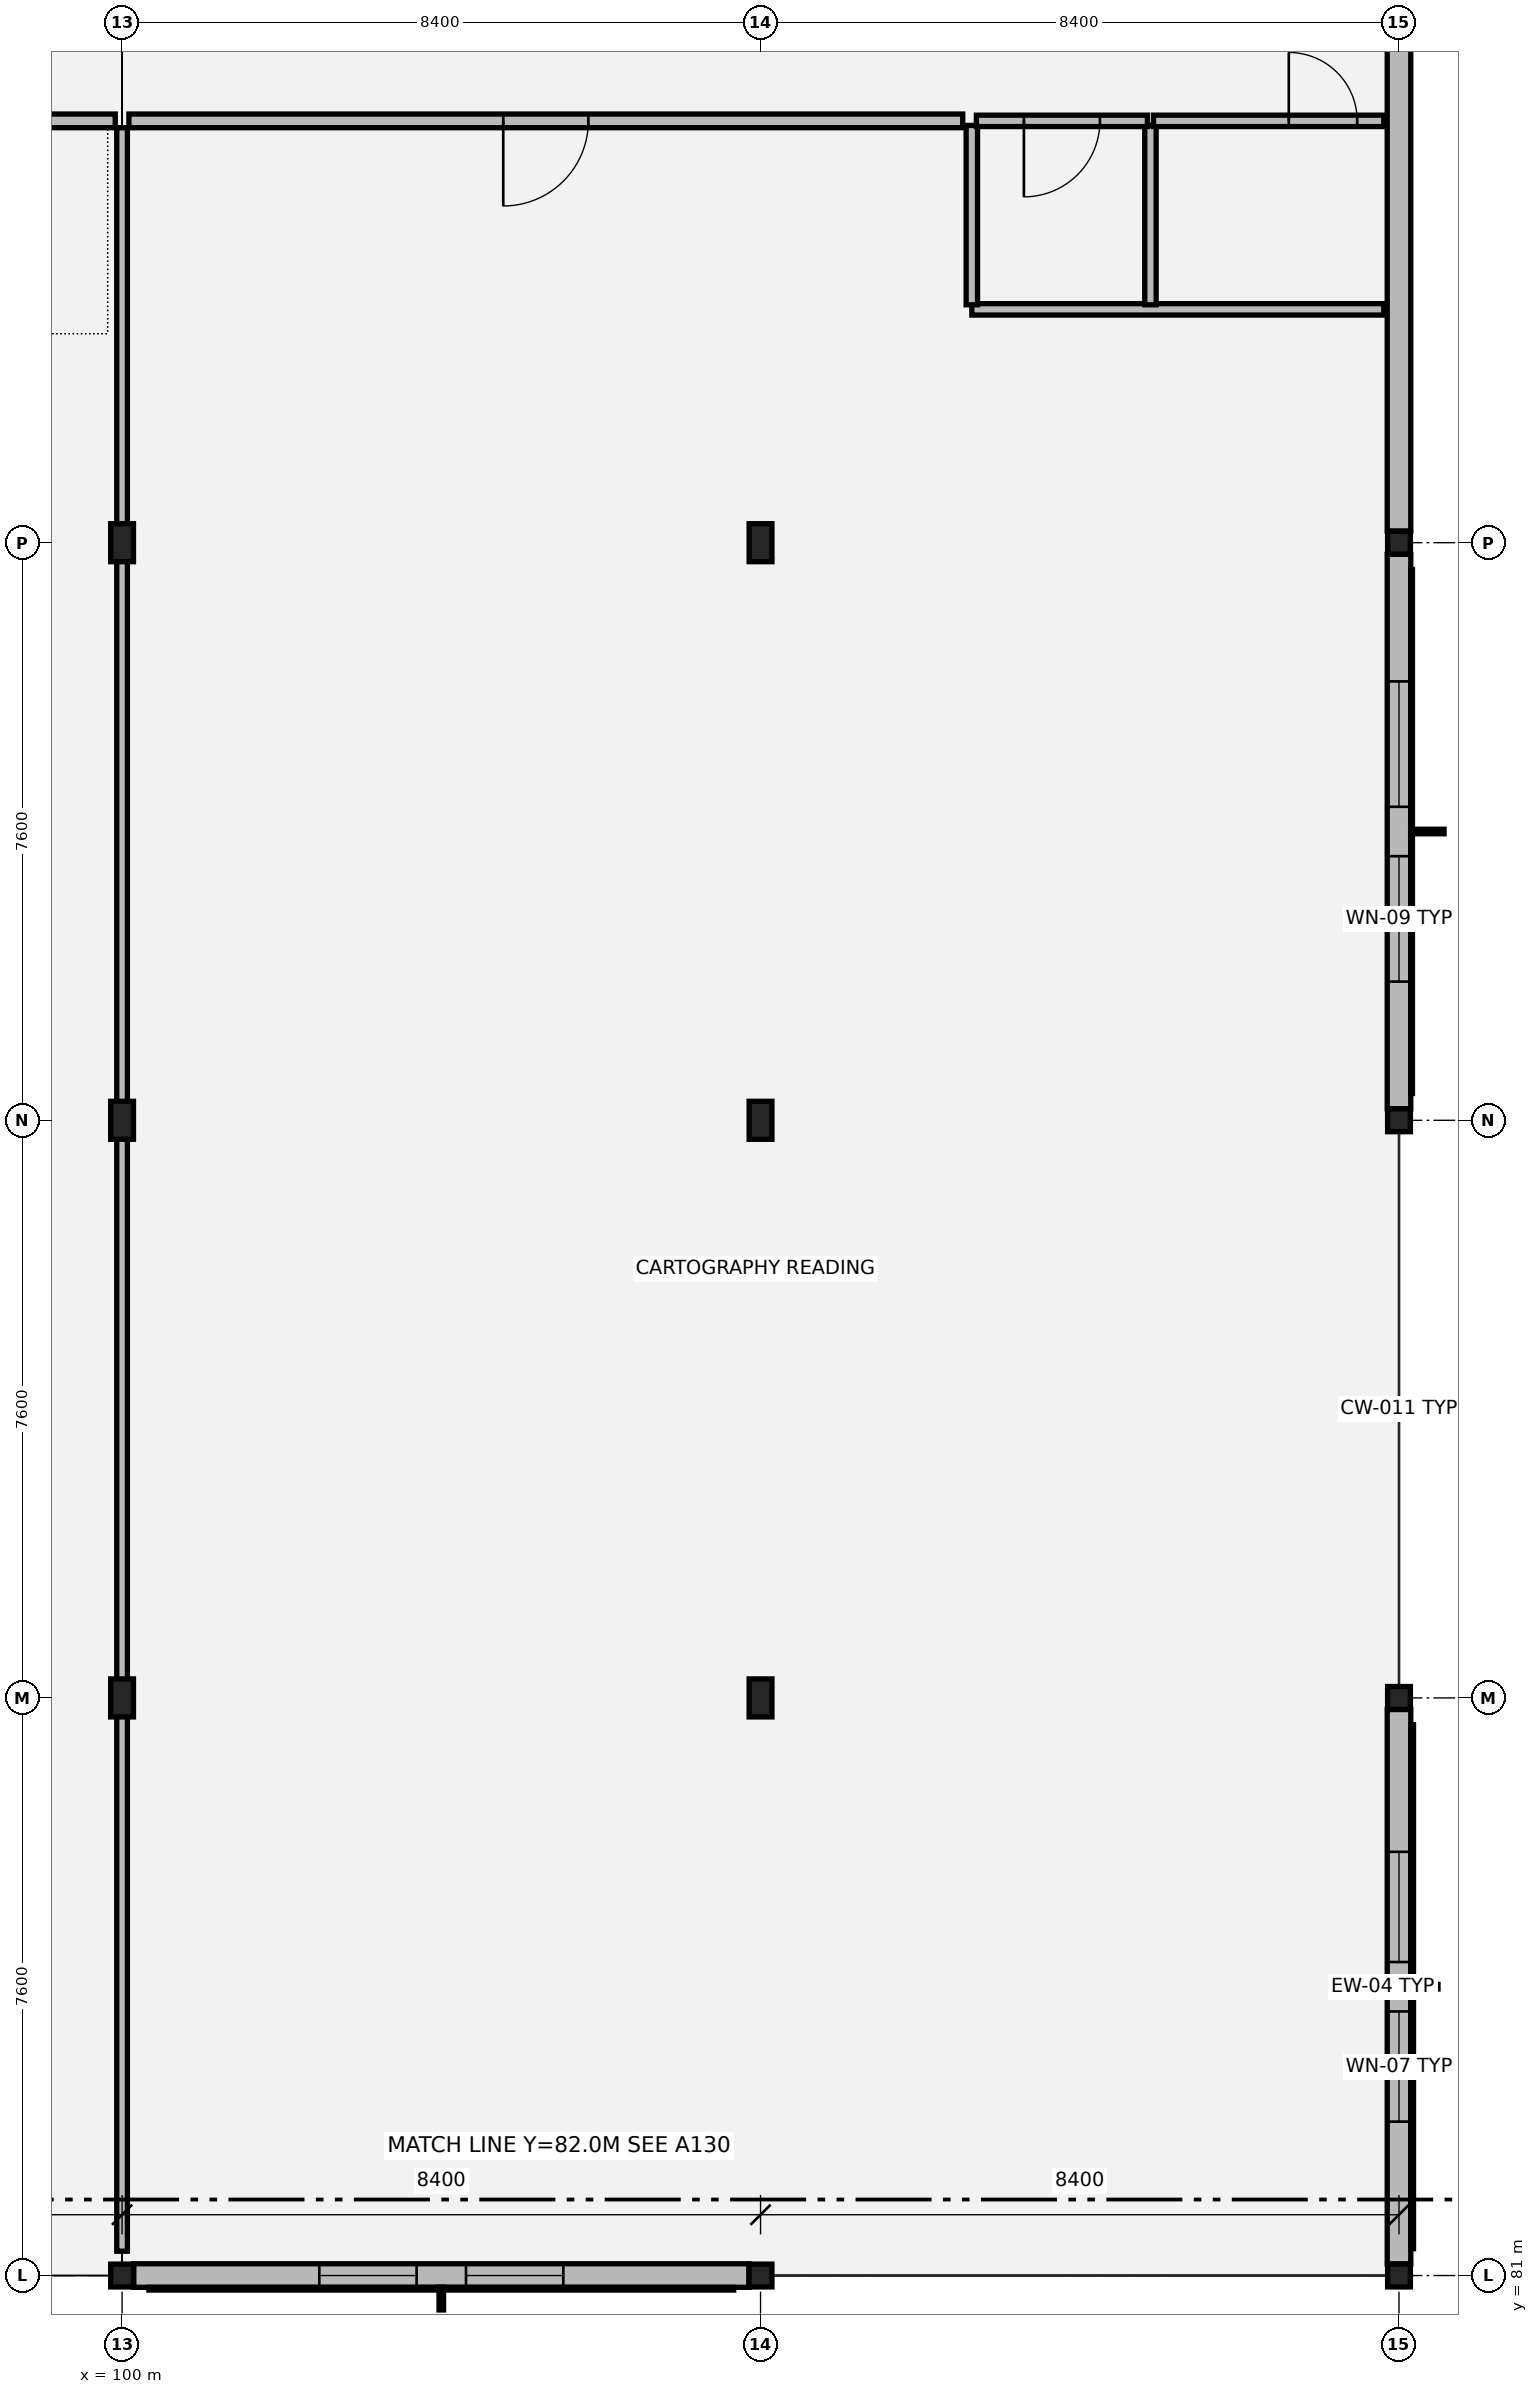
"""IFC4 building model, lengths in metres.
Left out: names, types, materials, properties, quantities, classifications, styles, units other than length and angle.
Written with IfcOpenShell. Run it as: python <this file> out.ifc"""

import sys

from ifc_helpers import new_model, si_unit, direction, frame, frame_2d, origin, origin_2d, place, context, subcontext, project, spatial, rectangle, hollow_rectangle, i_section, extrude, element, fill, save


model = new_model("IFC4")
c1 = context("Model", 3, precision=1e-05, world=origin(), true_north=direction((0.0, 1.0)))
c2 = subcontext(c1, "Body", "Model", "MODEL_VIEW")
j1 = project(units=[si_unit("LENGTHUNIT", "METRE"), si_unit("PLANEANGLEUNIT", "RADIAN")], contexts=[c1])
p1 = place(None, origin())
s1 = spatial("IfcSite", under=j1, at=p1, CompositionType="ELEMENT")
p2 = place(p1, origin())
s2 = spatial("IfcBuilding", under=s1, at=p2, CompositionType="ELEMENT")
p3 = place(p2, frame((0.0, 0.0, 5.1)))
s3 = spatial("IfcBuildingStorey", under=s2, at=p3, CompositionType="ELEMENT", Elevation=5.1)
p4 = place(p3, frame((100.0, 81.0, 0.0), z_axis=(0.0, 0.0, 1.0), x_axis=(1.0, 0.0, 0.0)))
e1 = element("IfcColumn", 1, at=p4, inside=s3, PredefinedType="COLUMN", context=c2, shape_type="SweptSolid", body=[
    extrude(hollow_rectangle(XDim=0.3, YDim=0.3, WallThickness=0.012, at=origin_2d()), origin(), (0.0, 0.0, 1.0), 4.055),
])
for number, where, z_axis, x_axis in (
    (2, (100.0, 88.6, 0.0), (0.0, 0.0, 1.0), (1.0, 0.0, 0.0)),
    (3, (100.0, 96.2, 0.0), (0.0, 0.0, 1.0), (1.0, 0.0, 0.0)),
    (4, (100.0, 103.8, 0.0), (0.0, 0.0, 1.0), (1.0, 0.0, 0.0)),
):
    element("IfcColumn", number, at=place(p3, frame(where, z_axis=z_axis, x_axis=x_axis)), inside=s3, PredefinedType="COLUMN", context=c2, shape_type="SweptSolid", body=[
        extrude(i_section(OverallWidth=0.3, OverallDepth=0.5, WebThickness=0.014, FlangeThickness=0.028, at=origin_2d()), origin(), (0.0, 0.0, 1.0), 4.055),
    ])
p5 = place(p3, frame((108.4, 81.0, 0.0), z_axis=(0.0, 0.0, 1.0), x_axis=(1.0, 0.0, 0.0)))
e5 = element("IfcColumn", 5, at=p5, inside=s3, PredefinedType="COLUMN", context=c2, shape_type="SweptSolid", body=[
    extrude(hollow_rectangle(XDim=0.3, YDim=0.3, WallThickness=0.012, at=origin_2d()), origin(), (0.0, 0.0, 1.0), 4.055),
])
for number, where, z_axis, x_axis in (
    (6, (108.4, 88.6, 0.0), (0.0, 0.0, 1.0), (1.0, 0.0, 0.0)),
    (7, (108.4, 96.2, 0.0), (0.0, 0.0, 1.0), (1.0, 0.0, 0.0)),
    (8, (108.4, 103.8, 0.0), (0.0, 0.0, 1.0), (1.0, 0.0, 0.0)),
):
    element("IfcColumn", number, at=place(p3, frame(where, z_axis=z_axis, x_axis=x_axis)), inside=s3, PredefinedType="COLUMN", context=c2, shape_type="SweptSolid", body=[
        extrude(i_section(OverallWidth=0.3, OverallDepth=0.5, WebThickness=0.014, FlangeThickness=0.028, at=origin_2d()), origin(), (0.0, 0.0, 1.0), 4.055),
    ])
for number, where, z_axis, x_axis in (
    (9, (116.8, 81.0, 0.0), (0.0, 0.0, 1.0), (1.0, 0.0, 0.0)),
    (10, (116.8, 88.6, 0.0), (0.0, 0.0, 1.0), (1.0, 0.0, 0.0)),
    (11, (116.8, 96.2, 0.0), (0.0, 0.0, 1.0), (1.0, 0.0, 0.0)),
    (12, (116.8, 103.8, 0.0), (0.0, 0.0, 1.0), (1.0, 0.0, 0.0)),
):
    element("IfcColumn", number, at=place(p3, frame(where, z_axis=z_axis, x_axis=x_axis)), inside=s3, PredefinedType="COLUMN", context=c2, shape_type="SweptSolid", body=[
        extrude(hollow_rectangle(XDim=0.3, YDim=0.3, WallThickness=0.012, at=origin_2d()), origin(), (0.0, 0.0, 1.0), 4.055),
    ])
p6 = place(p3, frame((100.153, 81.0, 0.0), z_axis=(0.0, 0.0, 1.0), x_axis=(1.0, 0.0, 0.0)))
e13 = element("IfcWall", 13, at=p6, inside=s3, PredefinedType="SOLIDWALL", context=c2, shape_type="SweptSolid", body=[
    extrude(rectangle(XDim=8.094, YDim=0.31, at=frame_2d((4.047, 0.0))), origin(), (0.0, 0.0, 1.0), 3.48),
])
p7 = place(p6, frame((2.442, 0.0, 0.8)))
e14 = element("IfcOpeningElement", 14, at=p7, cuts=e13, PredefinedType="OPENING", context=c2, shape_type="SweptSolid", body=[
    extrude(rectangle(XDim=1.28, YDim=2.08, at=frame_2d((0.64, 1.04))), frame((0.0, 0.165, 0.0), z_axis=(0.0, -1.0, 0.0), x_axis=(1.0, 0.0, 0.0)), (0.0, 0.0, 1.0), 0.33),
])
p8 = place(p6, frame((4.372, 0.0, 0.8)))
e15 = element("IfcOpeningElement", 15, at=p8, cuts=e13, PredefinedType="OPENING", context=c2, shape_type="SweptSolid", body=[
    extrude(rectangle(XDim=1.28, YDim=2.08, at=frame_2d((0.64, 1.04))), frame((0.0, 0.165, 0.0), z_axis=(0.0, -1.0, 0.0), x_axis=(1.0, 0.0, 0.0)), (0.0, 0.0, 1.0), 0.33),
])
p9 = place(p3, frame((116.8, 81.153, 0.0), z_axis=(0.0, 0.0, 1.0), x_axis=(0.0, 1.0, 0.0)))
e16 = element("IfcWall", 16, at=p9, inside=s3, PredefinedType="SOLIDWALL", context=c2, shape_type="SweptSolid", body=[
    extrude(rectangle(XDim=7.294, YDim=0.31, at=frame_2d((3.647, 0.0))), origin(), (0.0, 0.0, 1.0), 3.48),
])
p10 = place(p9, frame((1.872, 0.0, 0.8)))
e17 = element("IfcOpeningElement", 17, at=p10, cuts=e16, PredefinedType="OPENING", context=c2, shape_type="SweptSolid", body=[
    extrude(rectangle(XDim=1.45, YDim=2.2, at=frame_2d((0.725, 1.1))), frame((0.0, 0.165, 0.0), z_axis=(0.0, -1.0, 0.0), x_axis=(1.0, 0.0, 0.0)), (0.0, 0.0, 1.0), 0.33),
])
p11 = place(p9, frame((3.972, 0.0, 0.8)))
e18 = element("IfcOpeningElement", 18, at=p11, cuts=e16, PredefinedType="OPENING", context=c2, shape_type="SweptSolid", body=[
    extrude(rectangle(XDim=1.45, YDim=2.2, at=frame_2d((0.725, 1.1))), frame((0.0, 0.165, 0.0), z_axis=(0.0, -1.0, 0.0), x_axis=(1.0, 0.0, 0.0)), (0.0, 0.0, 1.0), 0.33),
])
p12 = place(p3, frame((116.8, 96.353, 0.0), z_axis=(0.0, 0.0, 1.0), x_axis=(0.0, 1.0, 0.0)))
e19 = element("IfcWall", 19, at=p12, inside=s3, PredefinedType="SOLIDWALL", context=c2, shape_type="SweptSolid", body=[
    extrude(rectangle(XDim=7.294, YDim=0.31, at=frame_2d((3.647, 0.0))), origin(), (0.0, 0.0, 1.0), 3.48),
])
p13 = place(p12, frame((1.672, 0.0, 0.8)))
e20 = element("IfcOpeningElement", 20, at=p13, cuts=e19, PredefinedType="OPENING", context=c2, shape_type="SweptSolid", body=[
    extrude(rectangle(XDim=1.65, YDim=2.25, at=frame_2d((0.825, 1.125))), frame((0.0, 0.165, 0.0), z_axis=(0.0, -1.0, 0.0), x_axis=(1.0, 0.0, 0.0)), (0.0, 0.0, 1.0), 0.33),
])
p14 = place(p12, frame((3.972, 0.0, 0.8)))
e21 = element("IfcOpeningElement", 21, at=p14, cuts=e19, PredefinedType="OPENING", context=c2, shape_type="SweptSolid", body=[
    extrude(rectangle(XDim=1.65, YDim=2.25, at=frame_2d((0.825, 1.125))), frame((0.0, 0.165, 0.0), z_axis=(0.0, -1.0, 0.0), x_axis=(1.0, 0.0, 0.0)), (0.0, 0.0, 1.0), 0.33),
])
p15 = place(p3, frame((116.8, 103.953, 0.0), z_axis=(0.0, 0.0, 1.0), x_axis=(0.0, 1.0, 0.0)))
e22 = element("IfcWall", 22, at=p15, inside=s3, PredefinedType="SOLIDWALL", context=c2, shape_type="SweptSolid", body=[
    extrude(rectangle(XDim=7.294, YDim=0.31, at=frame_2d((3.647, 0.0))), origin(), (0.0, 0.0, 1.0), 3.48),
])
p16 = place(p3, frame((111.18, 106.87, 0.0), z_axis=(0.0, 0.0, 1.0), x_axis=(1.0, 0.0, 0.0)))
e23 = element("IfcWall", 23, at=p16, inside=s3, PredefinedType="PARTITIONING", context=c2, shape_type="SweptSolid", body=[
    extrude(rectangle(XDim=5.42, YDim=0.15, at=frame_2d((2.71, 0.0))), origin(), (0.0, 0.0, 1.0), 3.18),
])
for number, where, z_axis, x_axis in (
    (24, (111.18, 106.93, 0.0), (0.0, 0.0, 1.0), (0.0, 1.0, 0.0)),
    (25, (113.53, 106.93, 0.0), (0.0, 0.0, 1.0), (0.0, 1.0, 0.0)),
):
    element("IfcWall", number, at=place(p3, frame(where, z_axis=z_axis, x_axis=x_axis)), inside=s3, PredefinedType="PARTITIONING", context=c2, shape_type="SweptSolid", body=[
        extrude(rectangle(XDim=2.36, YDim=0.15, at=frame_2d((1.18, 0.0))), origin(), (0.0, 0.0, 1.0), 3.18),
    ])
p17 = place(p3, frame((111.24, 109.35, 0.0), z_axis=(0.0, 0.0, 1.0), x_axis=(1.0, 0.0, 0.0)))
e26 = element("IfcWall", 26, at=p17, inside=s3, PredefinedType="PARTITIONING", context=c2, shape_type="SweptSolid", body=[
    extrude(rectangle(XDim=2.25, YDim=0.15, at=frame_2d((1.125, 0.0))), origin(), (0.0, 0.0, 1.0), 3.18),
])
p18 = place(p17, frame((0.625, 0.0, 0.0)))
e27 = element("IfcOpeningElement", 27, at=p18, cuts=e26, PredefinedType="OPENING", context=c2, shape_type="SweptSolid", body=[
    extrude(rectangle(XDim=1.0, YDim=2.15, at=frame_2d((0.5, 1.075))), frame((0.0, 0.085, 0.0), z_axis=(0.0, -1.0, 0.0), x_axis=(1.0, 0.0, 0.0)), (0.0, 0.0, 1.0), 0.17),
])
p19 = place(p3, frame((113.57, 109.35, 0.0), z_axis=(0.0, 0.0, 1.0), x_axis=(1.0, 0.0, 0.0)))
e28 = element("IfcWall", 28, at=p19, inside=s3, PredefinedType="PARTITIONING", context=c2, shape_type="SweptSolid", body=[
    extrude(rectangle(XDim=3.03, YDim=0.15, at=frame_2d((1.515, 0.0))), origin(), (0.0, 0.0, 1.0), 3.18),
])
p20 = place(p19, frame((1.78, 0.0, 0.0)))
e29 = element("IfcOpeningElement", 29, at=p20, cuts=e28, PredefinedType="OPENING", context=c2, shape_type="SweptSolid", body=[
    extrude(rectangle(XDim=0.9, YDim=2.15, at=frame_2d((0.45, 1.075))), frame((0.0, 0.085, 0.0), z_axis=(0.0, -1.0, 0.0), x_axis=(1.0, 0.0, 0.0)), (0.0, 0.0, 1.0), 0.17),
])
p21 = place(p3, frame((91.69, 109.35, 0.0), z_axis=(0.0, 0.0, 1.0), x_axis=(1.0, 0.0, 0.0)))
e30 = element("IfcWall", 30, at=p21, inside=s3, PredefinedType="PARTITIONING", context=c2, shape_type="SweptSolid", body=[
    extrude(rectangle(XDim=8.22, YDim=0.18, at=frame_2d((4.11, 0.0))), origin(), (0.0, 0.0, 1.0), 3.18),
])
p22 = place(p21, frame((3.48, 0.0, 0.0)))
e31 = element("IfcOpeningElement", 31, at=p22, cuts=e30, PredefinedType="OPENING", context=c2, shape_type="SweptSolid", body=[
    extrude(rectangle(XDim=1.26, YDim=2.2, at=frame_2d((0.63, 1.1))), frame((0.0, 0.1, 0.0), z_axis=(0.0, -1.0, 0.0), x_axis=(1.0, 0.0, 0.0)), (0.0, 0.0, 1.0), 0.2),
])
p23 = place(p3, frame((100.09, 109.35, 0.0), z_axis=(0.0, 0.0, 1.0), x_axis=(1.0, 0.0, 0.0)))
e32 = element("IfcWall", 32, at=p23, inside=s3, PredefinedType="PARTITIONING", context=c2, shape_type="SweptSolid", body=[
    extrude(rectangle(XDim=10.97, YDim=0.18, at=frame_2d((5.485, 0.0))), origin(), (0.0, 0.0, 1.0), 3.18),
])
p24 = place(p23, frame((4.925, 0.0, 0.0)))
e33 = element("IfcOpeningElement", 33, at=p24, cuts=e32, PredefinedType="OPENING", context=c2, shape_type="SweptSolid", body=[
    extrude(rectangle(XDim=1.12, YDim=2.15, at=frame_2d((0.56, 1.075))), frame((0.0, 0.1, 0.0), z_axis=(0.0, -1.0, 0.0), x_axis=(1.0, 0.0, 0.0)), (0.0, 0.0, 1.0), 0.2),
])
p25 = place(p3, frame((100.0, 81.32, 0.0), z_axis=(0.0, 0.0, 1.0), x_axis=(0.0, 1.0, 0.0)))
e34 = element("IfcWall", 34, at=p25, inside=s3, PredefinedType="PARTITIONING", context=c2, shape_type="SweptSolid", body=[
    extrude(rectangle(XDim=27.94, YDim=0.14, at=frame_2d((13.97, 0.0))), origin(), (0.0, 0.0, 1.0), 3.18),
])
p26 = place(p7, origin())
e35 = element("IfcWindow", 35, at=p26, inside=s3, PartitioningType="SINGLE_PANEL", PredefinedType="WINDOW", context=c2, shape_type="SweptSolid", body=[
    extrude(rectangle(XDim=1.28, YDim=2.08, at=frame_2d((0.64, 1.04))), frame((0.0, 0.03, 0.0), z_axis=(0.0, -1.0, 0.0), x_axis=(1.0, 0.0, 0.0)), (0.0, 0.0, 1.0), 0.06),
])
fill(e14, e35)
p27 = place(p8, origin())
e36 = element("IfcWindow", 36, at=p27, inside=s3, PartitioningType="SINGLE_PANEL", PredefinedType="WINDOW", context=c2, shape_type="SweptSolid", body=[
    extrude(rectangle(XDim=1.28, YDim=2.08, at=frame_2d((0.64, 1.04))), frame((0.0, 0.03, 0.0), z_axis=(0.0, -1.0, 0.0), x_axis=(1.0, 0.0, 0.0)), (0.0, 0.0, 1.0), 0.06),
])
fill(e15, e36)
p28 = place(p10, origin())
e37 = element("IfcWindow", 37, at=p28, inside=s3, PartitioningType="SINGLE_PANEL", PredefinedType="WINDOW", context=c2, shape_type="SweptSolid", body=[
    extrude(rectangle(XDim=1.45, YDim=2.2, at=frame_2d((0.725, 1.1))), frame((0.0, 0.03, 0.0), z_axis=(0.0, -1.0, 0.0), x_axis=(1.0, 0.0, 0.0)), (0.0, 0.0, 1.0), 0.06),
])
fill(e17, e37)
p29 = place(p11, origin())
e38 = element("IfcWindow", 38, at=p29, inside=s3, PartitioningType="SINGLE_PANEL", PredefinedType="WINDOW", context=c2, shape_type="SweptSolid", body=[
    extrude(rectangle(XDim=1.45, YDim=2.2, at=frame_2d((0.725, 1.1))), frame((0.0, 0.03, 0.0), z_axis=(0.0, -1.0, 0.0), x_axis=(1.0, 0.0, 0.0)), (0.0, 0.0, 1.0), 0.06),
])
fill(e18, e38)
p30 = place(p13, origin())
e39 = element("IfcWindow", 39, at=p30, inside=s3, PartitioningType="SINGLE_PANEL", PredefinedType="WINDOW", context=c2, shape_type="SweptSolid", body=[
    extrude(rectangle(XDim=1.65, YDim=2.25, at=frame_2d((0.825, 1.125))), frame((0.0, 0.03, 0.0), z_axis=(0.0, -1.0, 0.0), x_axis=(1.0, 0.0, 0.0)), (0.0, 0.0, 1.0), 0.06),
])
fill(e20, e39)
p31 = place(p14, origin())
e40 = element("IfcWindow", 40, at=p31, inside=s3, PartitioningType="SINGLE_PANEL", PredefinedType="WINDOW", context=c2, shape_type="SweptSolid", body=[
    extrude(rectangle(XDim=1.65, YDim=2.25, at=frame_2d((0.825, 1.125))), frame((0.0, 0.03, 0.0), z_axis=(0.0, -1.0, 0.0), x_axis=(1.0, 0.0, 0.0)), (0.0, 0.0, 1.0), 0.06),
])
fill(e21, e40)
p32 = place(p18, origin())
e41 = element("IfcDoor", 41, at=p32, inside=s3, OperationType="SINGLE_SWING_RIGHT", PredefinedType="DOOR", context=c2, shape_type="SweptSolid", body=[
    extrude(rectangle(XDim=1.0, YDim=2.15, at=frame_2d((0.5, 1.075))), frame((0.0, 0.025, 0.0), z_axis=(0.0, -1.0, 0.0), x_axis=(1.0, 0.0, 0.0)), (0.0, 0.0, 1.0), 0.05),
])
fill(e27, e41)
p33 = place(p20, origin())
e42 = element("IfcDoor", 42, at=p33, inside=s3, OperationType="SINGLE_SWING_LEFT", PredefinedType="DOOR", context=c2, shape_type="SweptSolid", body=[
    extrude(rectangle(XDim=0.9, YDim=2.15, at=frame_2d((0.45, 1.075))), frame((0.0, 0.025, 0.0), z_axis=(0.0, -1.0, 0.0), x_axis=(1.0, 0.0, 0.0)), (0.0, 0.0, 1.0), 0.05),
])
fill(e29, e42)
p34 = place(p24, origin())
e43 = element("IfcDoor", 43, at=p34, inside=s3, OperationType="SINGLE_SWING_RIGHT", PredefinedType="DOOR", context=c2, shape_type="SweptSolid", body=[
    extrude(rectangle(XDim=1.12, YDim=2.15, at=frame_2d((0.56, 1.075))), frame((0.0, 0.025, 0.0), z_axis=(0.0, -1.0, 0.0), x_axis=(1.0, 0.0, 0.0)), (0.0, 0.0, 1.0), 0.05),
])
fill(e33, e43)
save(model, sys.argv[1])
